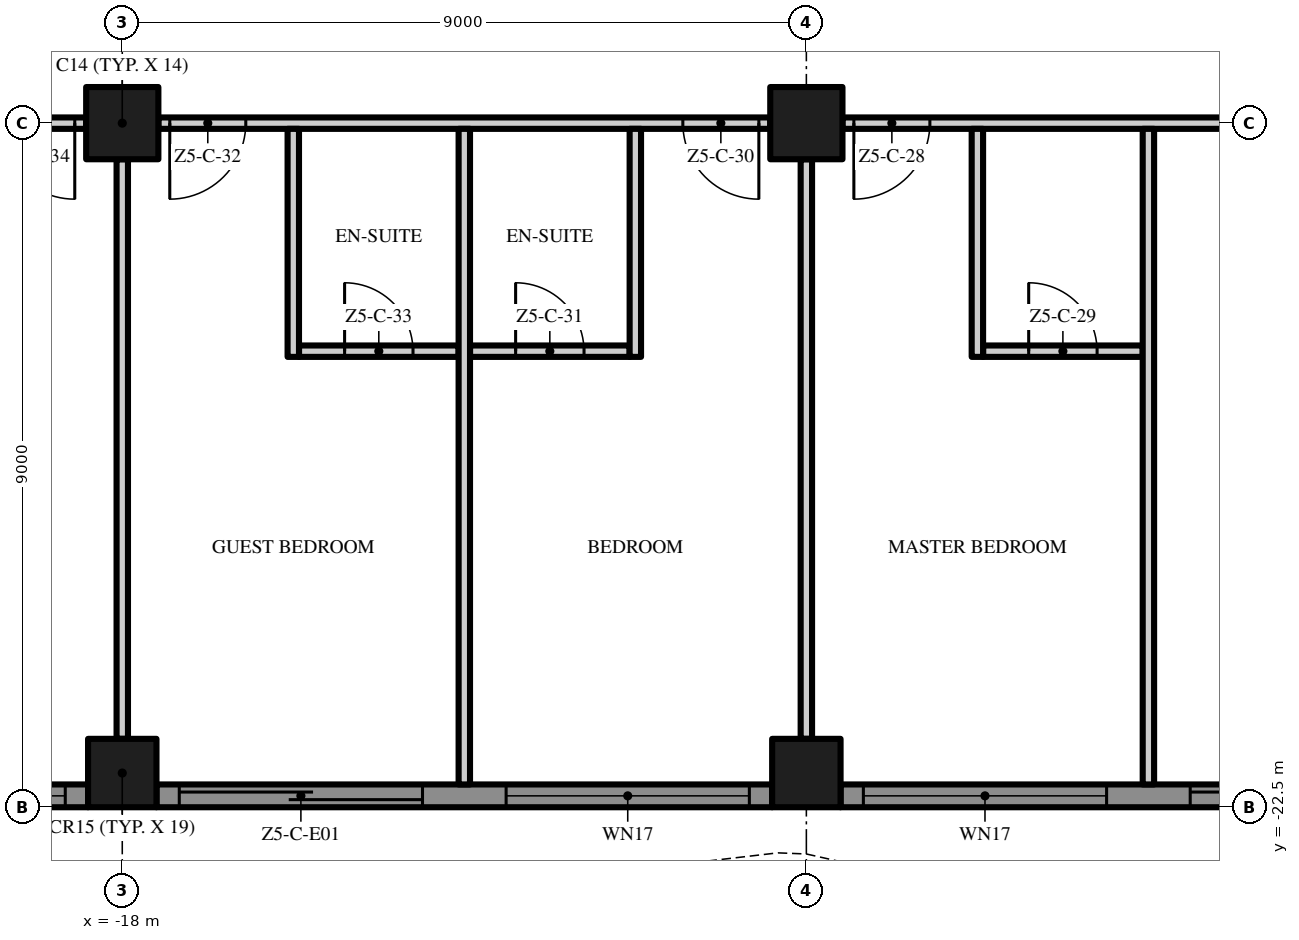
"""IFC4 building model, lengths in metres.
Left out: names, types, materials, properties, quantities, classifications, styles, units other than length and angle.
Written with IfcOpenShell. Run it as: python <this file> out.ifc"""

import sys

from ifc_helpers import new_model, si_unit, direction, frame, frame_2d, origin, origin_2d, place, context, subcontext, project, spatial, polyline, rectangle, outline, extrude, element, fill, save


model = new_model("IFC4")
c1 = context("Model", 3, precision=1e-05, world=origin(), true_north=direction((0.0, 1.0)))
c2 = subcontext(c1, "Body", "Model", "MODEL_VIEW")
j1 = project(units=[si_unit("LENGTHUNIT", "METRE"), si_unit("PLANEANGLEUNIT", "RADIAN")], contexts=[c1])
p1 = place(None, origin())
s1 = spatial("IfcSite", under=j1, at=p1, CompositionType="ELEMENT")
p2 = place(p1, origin())
s2 = spatial("IfcBuilding", under=s1, at=p2, CompositionType="ELEMENT")
p3 = place(p2, frame((0.0, 0.0, 269.2)))
s3 = spatial("IfcBuildingStorey", under=s2, at=p3, CompositionType="ELEMENT", Elevation=269.2)
p4 = place(p3, frame((-18.0, -13.5, 0.0), z_axis=(0.0, 0.0, 1.0), x_axis=(1.0, 0.0, 0.0)))
e1 = element("IfcColumn", 1, at=p4, inside=s3, PredefinedType="COLUMN", context=c2, shape_type="SweptSolid", body=[
    extrude(rectangle(XDim=0.95, YDim=0.95, at=origin_2d()), origin(), (0.0, 0.0, 1.0), 3.5),
])
p5 = place(p3, frame((-18.0, -22.05, 0.0), z_axis=(0.0, 0.0, 1.0), x_axis=(1.0, 0.0, 0.0)))
e2 = element("IfcColumn", 2, at=p5, inside=s3, PredefinedType="COLUMN", context=c2, shape_type="SweptSolid", body=[
    extrude(rectangle(XDim=0.9, YDim=0.9, at=origin_2d()), origin(), (0.0, 0.0, 1.0), 3.5),
])
p6 = place(p3, frame((-9.0, -13.5, 0.0), z_axis=(0.0, 0.0, 1.0), x_axis=(1.0, 0.0, 0.0)))
e3 = element("IfcColumn", 3, at=p6, inside=s3, PredefinedType="COLUMN", context=c2, shape_type="SweptSolid", body=[
    extrude(rectangle(XDim=0.95, YDim=0.95, at=origin_2d()), origin(), (0.0, 0.0, 1.0), 3.5),
])
p7 = place(p3, frame((-9.0, -22.05, 0.0), z_axis=(0.0, 0.0, 1.0), x_axis=(1.0, 0.0, 0.0)))
e4 = element("IfcColumn", 4, at=p7, inside=s3, PredefinedType="COLUMN", context=c2, shape_type="SweptSolid", body=[
    extrude(rectangle(XDim=0.9, YDim=0.9, at=origin_2d()), origin(), (0.0, 0.0, 1.0), 3.5),
])
p8 = place(p3, frame((-18.45, -22.35, 0.0), z_axis=(0.0, 0.0, 1.0), x_axis=(-1.0, 0.0, 0.0)))
e5 = element("IfcWall", 5, at=p8, inside=s3, PredefinedType="SOLIDWALL", context=c2, shape_type="SweptSolid", body=[
    extrude(rectangle(XDim=3.75, YDim=0.3, at=frame_2d((1.875, 0.0))), origin(), (0.0, 0.0, 1.0), 3.5),
])
p9 = place(p8, frame((0.3, 0.0, 0.45)))
e6 = element("IfcOpeningElement", 6, at=p9, cuts=e5, PredefinedType="OPENING", context=c2, shape_type="SweptSolid", body=[
    extrude(rectangle(XDim=3.15, YDim=2.65, at=frame_2d((1.575, 1.325))), frame((0.0, 0.16, 0.0), z_axis=(0.0, -1.0, 0.0), x_axis=(1.0, 0.0, 0.0)), (0.0, 0.0, 1.0), 0.32),
])
p10 = place(p3, frame((-9.45, -22.35, 0.0), z_axis=(0.0, 0.0, 1.0), x_axis=(-1.0, 0.0, 0.0)))
e7 = element("IfcWall", 7, at=p10, inside=s3, PredefinedType="SOLIDWALL", context=c2, shape_type="SweptSolid", body=[
    extrude(rectangle(XDim=8.1, YDim=0.3, at=frame_2d((4.05, 0.0))), origin(), (0.0, 0.0, 1.0), 3.5),
])
p11 = place(p10, frame((4.6, 0.0, 0.0)))
e8 = element("IfcOpeningElement", 8, at=p11, cuts=e7, PredefinedType="OPENING", context=c2, shape_type="SweptSolid", body=[
    extrude(rectangle(XDim=3.2, YDim=2.4, at=frame_2d((1.6, 1.2))), frame((0.0, 0.16, 0.0), z_axis=(0.0, -1.0, 0.0), x_axis=(1.0, 0.0, 0.0)), (0.0, 0.0, 1.0), 0.32),
])
p12 = place(p10, frame((0.3, 0.0, 0.45)))
e9 = element("IfcOpeningElement", 9, at=p12, cuts=e7, PredefinedType="OPENING", context=c2, shape_type="SweptSolid", body=[
    extrude(rectangle(XDim=3.2, YDim=2.65, at=frame_2d((1.6, 1.325))), frame((0.0, 0.16, 0.0), z_axis=(0.0, -1.0, 0.0), x_axis=(1.0, 0.0, 0.0)), (0.0, 0.0, 1.0), 0.32),
])
p13 = place(p3, frame((-0.45, -22.35, 0.0), z_axis=(0.0, 0.0, 1.0), x_axis=(-1.0, 0.0, 0.0)))
e10 = element("IfcWall", 10, at=p13, inside=s3, PredefinedType="SOLIDWALL", context=c2, shape_type="SweptSolid", body=[
    extrude(rectangle(XDim=8.1, YDim=0.3, at=frame_2d((4.05, 0.0))), origin(), (0.0, 0.0, 1.0), 3.5),
])
p14 = place(p13, frame((4.6, 0.0, 0.45)))
e11 = element("IfcOpeningElement", 11, at=p14, cuts=e10, PredefinedType="OPENING", context=c2, shape_type="SweptSolid", body=[
    extrude(rectangle(XDim=3.2, YDim=2.65, at=frame_2d((1.6, 1.325))), frame((0.0, 0.16, 0.0), z_axis=(0.0, -1.0, 0.0), x_axis=(1.0, 0.0, 0.0)), (0.0, 0.0, 1.0), 0.32),
])
p15 = place(p13, frame((0.3, 0.0, 0.0)))
e12 = element("IfcOpeningElement", 12, at=p15, cuts=e10, PredefinedType="OPENING", context=c2, shape_type="SweptSolid", body=[
    extrude(rectangle(XDim=3.2, YDim=2.4, at=frame_2d((1.6, 1.2))), frame((0.0, 0.16, 0.0), z_axis=(0.0, -1.0, 0.0), x_axis=(1.0, 0.0, 0.0)), (0.0, 0.0, 1.0), 0.32),
])
p16 = place(p3, origin())
e13 = element("IfcWall", 13, at=p16, inside=s3, PredefinedType="USERDEFINED", context=c2, shape_type="SweptSolid", body=[
    extrude(outline(polyline([(-22.5, -23.451), (-21.0, -24.112), (-19.5, -24.845), (-18.0, -25.369), (-16.875, -25.5), (-16.5, -25.485), (-15.0, -25.149), (-13.5, -24.488), (-12.0, -23.755), (-10.5, -23.231), (-9.375, -23.1), (-9.0, -23.115), (-7.5, -23.451), (-6.0, -24.112), (-4.5, -24.845), (-3.0, -25.369), (-1.875, -25.5), (-1.5, -25.485), (0.0, -25.149), (1.5, -24.488), (3.0, -23.755), (4.5, -23.231), (5.625, -23.1), (6.0, -23.115), (7.5, -23.451), (9.0, -24.112), (10.5, -24.845), (12.0, -25.369), (13.125, -25.5), (13.5, -25.485), (15.0, -25.149), (16.5, -24.488), (18.0, -23.755), (19.5, -23.231), (20.625, -23.1), (21.0, -23.115), (22.5, -23.451), (22.555, -23.208), (21.033, -22.866), (20.615, -22.849), (19.444, -22.986), (17.904, -23.524), (16.395, -24.261), (14.921, -24.91), (13.467, -25.236), (13.135, -25.249), (12.056, -25.124), (10.596, -24.614), (9.105, -23.885), (7.579, -23.213), (6.033, -22.866), (5.615, -22.849), (4.444, -22.986), (2.904, -23.524), (1.395, -24.261), (-0.079, -24.91), (-1.533, -25.236), (-1.865, -25.249), (-2.944, -25.124), (-4.404, -24.614), (-5.895, -23.885), (-7.421, -23.213), (-8.967, -22.866), (-9.385, -22.849), (-10.556, -22.986), (-12.096, -23.524), (-13.605, -24.261), (-15.079, -24.91), (-16.533, -25.236), (-16.865, -25.249), (-17.944, -25.124), (-19.404, -24.614), (-20.895, -23.885), (-22.399, -23.223), (-22.5, -23.451)])), origin(), (0.0, 0.0, 1.0), 0.9),
])
p17 = place(p3, frame((-15.675, -16.5, 0.0), z_axis=(0.0, 0.0, 1.0), x_axis=(1.0, 0.0, 0.0)))
e14 = element("IfcWall", 14, at=p17, inside=s3, PredefinedType="PARTITIONING", context=c2, shape_type="SweptSolid", body=[
    extrude(rectangle(XDim=2.1, YDim=0.15, at=frame_2d((1.05, 0.0))), origin(), (0.0, 0.0, 1.0), 3.5),
])
p18 = place(p17, frame((0.6, 0.0, 0.0)))
e15 = element("IfcOpeningElement", 15, at=p18, cuts=e14, PredefinedType="OPENING", context=c2, shape_type="SweptSolid", body=[
    extrude(rectangle(XDim=0.9, YDim=2.1, at=frame_2d((0.45, 1.05))), frame((0.0, 0.085, 0.0), z_axis=(0.0, -1.0, 0.0), x_axis=(1.0, 0.0, 0.0)), (0.0, 0.0, 1.0), 0.17),
])
p19 = place(p3, frame((-13.425, -16.5, 0.0), z_axis=(0.0, 0.0, 1.0), x_axis=(1.0, 0.0, 0.0)))
e16 = element("IfcWall", 16, at=p19, inside=s3, PredefinedType="PARTITIONING", context=c2, shape_type="SweptSolid", body=[
    extrude(rectangle(XDim=2.1, YDim=0.15, at=frame_2d((1.05, 0.0))), origin(), (0.0, 0.0, 1.0), 3.5),
])
p20 = place(p19, frame((0.6, 0.0, 0.0)))
e17 = element("IfcOpeningElement", 17, at=p20, cuts=e16, PredefinedType="OPENING", context=c2, shape_type="SweptSolid", body=[
    extrude(rectangle(XDim=0.9, YDim=2.1, at=frame_2d((0.45, 1.05))), frame((0.0, 0.085, 0.0), z_axis=(0.0, -1.0, 0.0), x_axis=(1.0, 0.0, 0.0)), (0.0, 0.0, 1.0), 0.17),
])
p21 = place(p3, frame((-6.675, -16.5, 0.0), z_axis=(0.0, 0.0, 1.0), x_axis=(1.0, 0.0, 0.0)))
e18 = element("IfcWall", 18, at=p21, inside=s3, PredefinedType="PARTITIONING", context=c2, shape_type="SweptSolid", body=[
    extrude(rectangle(XDim=2.1, YDim=0.15, at=frame_2d((1.05, 0.0))), origin(), (0.0, 0.0, 1.0), 3.5),
])
p22 = place(p21, frame((0.6, 0.0, 0.0)))
e19 = element("IfcOpeningElement", 19, at=p22, cuts=e18, PredefinedType="OPENING", context=c2, shape_type="SweptSolid", body=[
    extrude(rectangle(XDim=0.9, YDim=2.1, at=frame_2d((0.45, 1.05))), frame((0.0, 0.085, 0.0), z_axis=(0.0, -1.0, 0.0), x_axis=(1.0, 0.0, 0.0)), (0.0, 0.0, 1.0), 0.17),
])
p23 = place(p3, frame((-18.475, -13.5, 0.0), z_axis=(0.0, 0.0, 1.0), x_axis=(-1.0, 0.0, 0.0)))
e20 = element("IfcWall", 20, at=p23, inside=s3, PredefinedType="PARTITIONING", context=c2, shape_type="SweptSolid", body=[
    extrude(rectangle(XDim=7.625, YDim=0.15, at=frame_2d((3.812, 0.0))), origin(), (0.0, 0.0, 1.0), 3.5),
])
p24 = place(p23, frame((0.15, 0.0, 0.0)))
e21 = element("IfcOpeningElement", 21, at=p24, cuts=e20, PredefinedType="OPENING", context=c2, shape_type="SweptSolid", body=[
    extrude(rectangle(XDim=1.0, YDim=2.4, at=frame_2d((0.5, 1.2))), frame((0.0, 0.085, 0.0), z_axis=(0.0, -1.0, 0.0), x_axis=(1.0, 0.0, 0.0)), (0.0, 0.0, 1.0), 0.17),
])
p25 = place(p23, frame((5.775, 0.0, 0.0)))
e22 = element("IfcOpeningElement", 22, at=p25, cuts=e20, PredefinedType="OPENING", context=c2, shape_type="SweptSolid", body=[
    extrude(rectangle(XDim=1.0, YDim=2.4, at=frame_2d((0.5, 1.2))), frame((0.0, 0.085, 0.0), z_axis=(0.0, -1.0, 0.0), x_axis=(1.0, 0.0, 0.0)), (0.0, 0.0, 1.0), 0.17),
])
p26 = place(p3, frame((-9.475, -13.5, 0.0), z_axis=(0.0, 0.0, 1.0), x_axis=(-1.0, 0.0, 0.0)))
e23 = element("IfcWall", 23, at=p26, inside=s3, PredefinedType="PARTITIONING", context=c2, shape_type="SweptSolid", body=[
    extrude(rectangle(XDim=8.05, YDim=0.15, at=frame_2d((4.025, 0.0))), origin(), (0.0, 0.0, 1.0), 3.5),
])
p27 = place(p26, frame((0.15, 0.0, 0.0)))
e24 = element("IfcOpeningElement", 24, at=p27, cuts=e23, PredefinedType="OPENING", context=c2, shape_type="SweptSolid", body=[
    extrude(rectangle(XDim=1.0, YDim=2.4, at=frame_2d((0.5, 1.2))), frame((0.0, 0.085, 0.0), z_axis=(0.0, -1.0, 0.0), x_axis=(1.0, 0.0, 0.0)), (0.0, 0.0, 1.0), 0.17),
])
p28 = place(p26, frame((6.9, 0.0, 0.0)))
e25 = element("IfcOpeningElement", 25, at=p28, cuts=e23, PredefinedType="OPENING", context=c2, shape_type="SweptSolid", body=[
    extrude(rectangle(XDim=1.0, YDim=2.4, at=frame_2d((0.5, 1.2))), frame((0.0, 0.085, 0.0), z_axis=(0.0, -1.0, 0.0), x_axis=(1.0, 0.0, 0.0)), (0.0, 0.0, 1.0), 0.17),
])
p29 = place(p3, frame((-0.475, -13.5, 0.0), z_axis=(0.0, 0.0, 1.0), x_axis=(-1.0, 0.0, 0.0)))
e26 = element("IfcWall", 26, at=p29, inside=s3, PredefinedType="PARTITIONING", context=c2, shape_type="SweptSolid", body=[
    extrude(rectangle(XDim=8.05, YDim=0.15, at=frame_2d((4.025, 0.0))), origin(), (0.0, 0.0, 1.0), 3.5),
])
p30 = place(p29, frame((0.15, 0.0, 0.0)))
e27 = element("IfcOpeningElement", 27, at=p30, cuts=e26, PredefinedType="OPENING", context=c2, shape_type="SweptSolid", body=[
    extrude(rectangle(XDim=1.8, YDim=2.4, at=frame_2d((0.9, 1.2))), frame((0.0, 0.085, 0.0), z_axis=(0.0, -1.0, 0.0), x_axis=(1.0, 0.0, 0.0)), (0.0, 0.0, 1.0), 0.17),
])
p31 = place(p29, frame((6.9, 0.0, 0.0)))
e28 = element("IfcOpeningElement", 28, at=p31, cuts=e26, PredefinedType="OPENING", context=c2, shape_type="SweptSolid", body=[
    extrude(rectangle(XDim=1.0, YDim=2.4, at=frame_2d((0.5, 1.2))), frame((0.0, 0.085, 0.0), z_axis=(0.0, -1.0, 0.0), x_axis=(1.0, 0.0, 0.0)), (0.0, 0.0, 1.0), 0.17),
])
p32 = place(p3, frame((-18.0, -21.6, 0.0), z_axis=(0.0, 0.0, 1.0), x_axis=(0.0, 1.0, 0.0)))
e29 = element("IfcWall", 29, at=p32, inside=s3, PredefinedType="PARTITIONING", context=c2, shape_type="SweptSolid", body=[
    extrude(rectangle(XDim=7.625, YDim=0.15, at=frame_2d((3.812, 0.0))), origin(), (0.0, 0.0, 1.0), 3.5),
])
p33 = place(p3, frame((-15.75, -16.575, 0.0), z_axis=(0.0, 0.0, 1.0), x_axis=(0.0, 1.0, 0.0)))
e30 = element("IfcWall", 30, at=p33, inside=s3, PredefinedType="PARTITIONING", context=c2, shape_type="SweptSolid", body=[
    extrude(rectangle(XDim=3.0, YDim=0.15, at=frame_2d((1.5, 0.0))), origin(), (0.0, 0.0, 1.0), 3.5),
])
p34 = place(p3, frame((-13.5, -22.2, 0.0), z_axis=(0.0, 0.0, 1.0), x_axis=(0.0, 1.0, 0.0)))
e31 = element("IfcWall", 31, at=p34, inside=s3, PredefinedType="PARTITIONING", context=c2, shape_type="SweptSolid", body=[
    extrude(rectangle(XDim=8.625, YDim=0.15, at=frame_2d((4.312, 0.0))), origin(), (0.0, 0.0, 1.0), 3.5),
])
p35 = place(p3, frame((-11.25, -16.575, 0.0), z_axis=(0.0, 0.0, 1.0), x_axis=(0.0, 1.0, 0.0)))
e32 = element("IfcWall", 32, at=p35, inside=s3, PredefinedType="PARTITIONING", context=c2, shape_type="SweptSolid", body=[
    extrude(rectangle(XDim=3.0, YDim=0.15, at=frame_2d((1.5, 0.0))), origin(), (0.0, 0.0, 1.0), 3.5),
])
p36 = place(p3, frame((-9.0, -21.6, 0.0), z_axis=(0.0, 0.0, 1.0), x_axis=(0.0, 1.0, 0.0)))
e33 = element("IfcWall", 33, at=p36, inside=s3, PredefinedType="PARTITIONING", context=c2, shape_type="SweptSolid", body=[
    extrude(rectangle(XDim=7.625, YDim=0.15, at=frame_2d((3.812, 0.0))), origin(), (0.0, 0.0, 1.0), 3.5),
])
p37 = place(p3, frame((-6.75, -16.575, 0.0), z_axis=(0.0, 0.0, 1.0), x_axis=(0.0, 1.0, 0.0)))
e34 = element("IfcWall", 34, at=p37, inside=s3, PredefinedType="PARTITIONING", context=c2, shape_type="SweptSolid", body=[
    extrude(rectangle(XDim=3.0, YDim=0.15, at=frame_2d((1.5, 0.0))), origin(), (0.0, 0.0, 1.0), 3.5),
])
p38 = place(p3, frame((-4.5, -22.2, 0.0), z_axis=(0.0, 0.0, 1.0), x_axis=(0.0, 1.0, 0.0)))
e35 = element("IfcWall", 35, at=p38, inside=s3, PredefinedType="PARTITIONING", context=c2, shape_type="SweptSolid", body=[
    extrude(rectangle(XDim=8.625, YDim=0.15, at=frame_2d((4.312, 0.0))), origin(), (0.0, 0.0, 1.0), 3.5),
])
p39 = place(p9, origin())
e36 = element("IfcWindow", 36, at=p39, inside=s3, PartitioningType="SINGLE_PANEL", PredefinedType="WINDOW", context=c2, shape_type="SweptSolid", body=[
    extrude(rectangle(XDim=3.15, YDim=2.65, at=frame_2d((1.575, 1.325))), frame((0.0, 0.03, 0.0), z_axis=(0.0, -1.0, 0.0), x_axis=(1.0, 0.0, 0.0)), (0.0, 0.0, 1.0), 0.06),
])
fill(e6, e36)
p40 = place(p11, origin())
e37 = element("IfcDoor", 37, at=p40, inside=s3, OperationType="SINGLE_SWING_LEFT", PredefinedType="DOOR", context=c2, shape_type="SweptSolid", body=[
    extrude(rectangle(XDim=3.2, YDim=2.4, at=frame_2d((1.6, 1.2))), frame((0.0, 0.025, 0.0), z_axis=(0.0, -1.0, 0.0), x_axis=(1.0, 0.0, 0.0)), (0.0, 0.0, 1.0), 0.05),
])
fill(e8, e37)
p41 = place(p12, origin())
e38 = element("IfcWindow", 38, at=p41, inside=s3, PartitioningType="SINGLE_PANEL", PredefinedType="WINDOW", context=c2, shape_type="SweptSolid", body=[
    extrude(rectangle(XDim=3.2, YDim=2.65, at=frame_2d((1.6, 1.325))), frame((0.0, 0.03, 0.0), z_axis=(0.0, -1.0, 0.0), x_axis=(1.0, 0.0, 0.0)), (0.0, 0.0, 1.0), 0.06),
])
fill(e9, e38)
p42 = place(p14, origin())
e39 = element("IfcWindow", 39, at=p42, inside=s3, PartitioningType="SINGLE_PANEL", PredefinedType="WINDOW", context=c2, shape_type="SweptSolid", body=[
    extrude(rectangle(XDim=3.2, YDim=2.65, at=frame_2d((1.6, 1.325))), frame((0.0, 0.03, 0.0), z_axis=(0.0, -1.0, 0.0), x_axis=(1.0, 0.0, 0.0)), (0.0, 0.0, 1.0), 0.06),
])
fill(e11, e39)
p43 = place(p15, origin())
e40 = element("IfcDoor", 40, at=p43, inside=s3, OperationType="SINGLE_SWING_LEFT", PredefinedType="DOOR", context=c2, shape_type="SweptSolid", body=[
    extrude(rectangle(XDim=3.2, YDim=2.4, at=frame_2d((1.6, 1.2))), frame((0.0, 0.025, 0.0), z_axis=(0.0, -1.0, 0.0), x_axis=(1.0, 0.0, 0.0)), (0.0, 0.0, 1.0), 0.05),
])
fill(e12, e40)
p44 = place(p31, origin())
e41 = element("IfcDoor", 41, at=p44, inside=s3, OperationType="SINGLE_SWING_RIGHT", PredefinedType="DOOR", context=c2, shape_type="SweptSolid", body=[
    extrude(rectangle(XDim=1.0, YDim=2.4, at=frame_2d((0.5, 1.2))), frame((0.0, 0.025, 0.0), z_axis=(0.0, -1.0, 0.0), x_axis=(1.0, 0.0, 0.0)), (0.0, 0.0, 1.0), 0.05),
])
fill(e28, e41)
p45 = place(p22, origin())
e42 = element("IfcDoor", 42, at=p45, inside=s3, OperationType="SINGLE_SWING_LEFT", PredefinedType="DOOR", context=c2, shape_type="SweptSolid", body=[
    extrude(rectangle(XDim=0.9, YDim=2.1, at=frame_2d((0.45, 1.05))), frame((0.0, 0.025, 0.0), z_axis=(0.0, -1.0, 0.0), x_axis=(1.0, 0.0, 0.0)), (0.0, 0.0, 1.0), 0.05),
])
fill(e19, e42)
p46 = place(p27, origin())
e43 = element("IfcDoor", 43, at=p46, inside=s3, OperationType="SINGLE_SWING_LEFT", PredefinedType="DOOR", context=c2, shape_type="SweptSolid", body=[
    extrude(rectangle(XDim=1.0, YDim=2.4, at=frame_2d((0.5, 1.2))), frame((0.0, 0.025, 0.0), z_axis=(0.0, -1.0, 0.0), x_axis=(1.0, 0.0, 0.0)), (0.0, 0.0, 1.0), 0.05),
])
fill(e24, e43)
p47 = place(p20, origin())
e44 = element("IfcDoor", 44, at=p47, inside=s3, OperationType="SINGLE_SWING_LEFT", PredefinedType="DOOR", context=c2, shape_type="SweptSolid", body=[
    extrude(rectangle(XDim=0.9, YDim=2.1, at=frame_2d((0.45, 1.05))), frame((0.0, 0.025, 0.0), z_axis=(0.0, -1.0, 0.0), x_axis=(1.0, 0.0, 0.0)), (0.0, 0.0, 1.0), 0.05),
])
fill(e17, e44)
p48 = place(p28, origin())
e45 = element("IfcDoor", 45, at=p48, inside=s3, OperationType="SINGLE_SWING_RIGHT", PredefinedType="DOOR", context=c2, shape_type="SweptSolid", body=[
    extrude(rectangle(XDim=1.0, YDim=2.4, at=frame_2d((0.5, 1.2))), frame((0.0, 0.025, 0.0), z_axis=(0.0, -1.0, 0.0), x_axis=(1.0, 0.0, 0.0)), (0.0, 0.0, 1.0), 0.05),
])
fill(e25, e45)
p49 = place(p18, origin())
e46 = element("IfcDoor", 46, at=p49, inside=s3, OperationType="SINGLE_SWING_LEFT", PredefinedType="DOOR", context=c2, shape_type="SweptSolid", body=[
    extrude(rectangle(XDim=0.9, YDim=2.1, at=frame_2d((0.45, 1.05))), frame((0.0, 0.025, 0.0), z_axis=(0.0, -1.0, 0.0), x_axis=(1.0, 0.0, 0.0)), (0.0, 0.0, 1.0), 0.05),
])
fill(e15, e46)
p50 = place(p24, origin())
e47 = element("IfcDoor", 47, at=p50, inside=s3, OperationType="SINGLE_SWING_LEFT", PredefinedType="DOOR", context=c2, shape_type="SweptSolid", body=[
    extrude(rectangle(XDim=1.0, YDim=2.4, at=frame_2d((0.5, 1.2))), frame((0.0, 0.025, 0.0), z_axis=(0.0, -1.0, 0.0), x_axis=(1.0, 0.0, 0.0)), (0.0, 0.0, 1.0), 0.05),
])
fill(e21, e47)
save(model, sys.argv[1])
